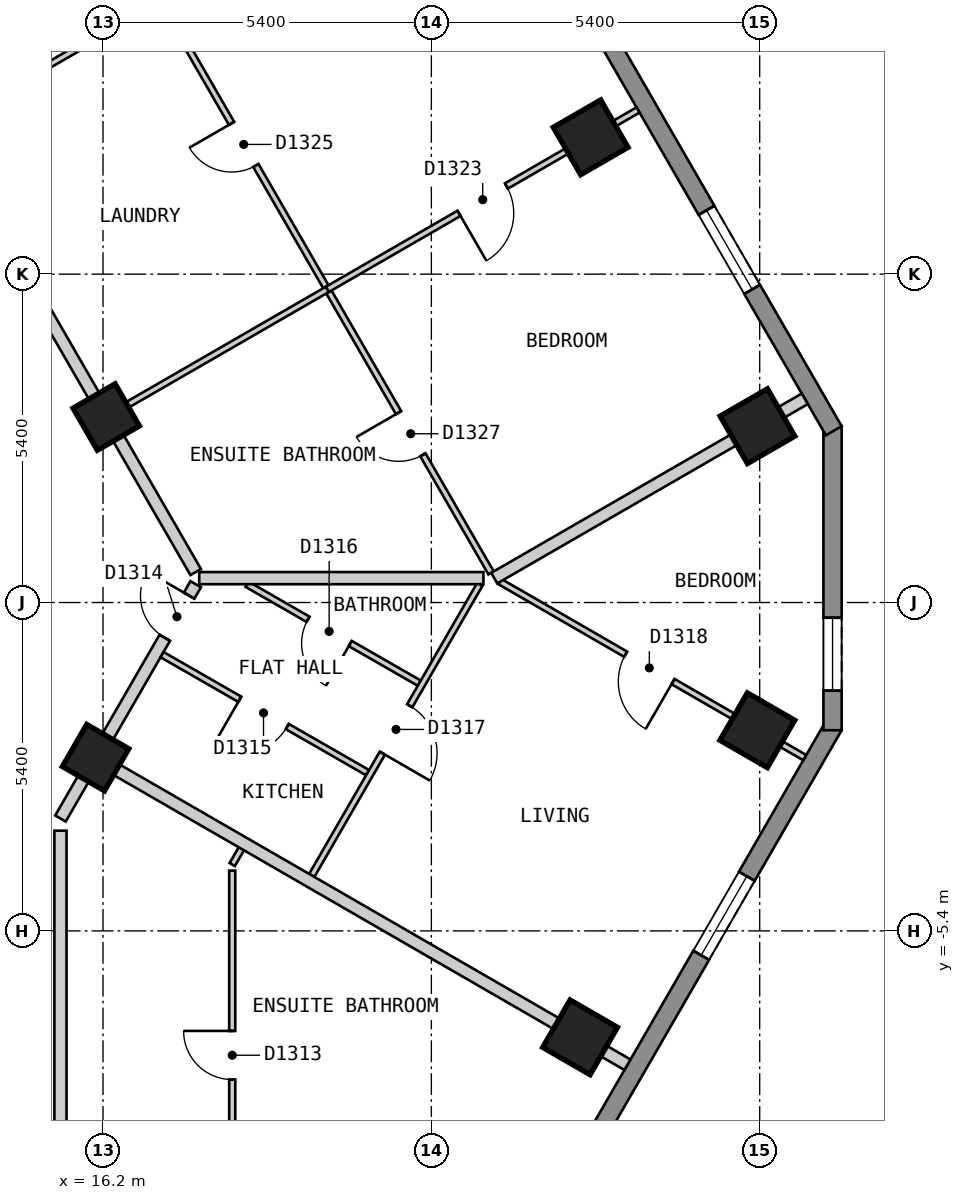
"""IFC4 building model, lengths in metres.
Left out: names, types, materials, properties, quantities, classifications, styles, units other than length and angle.
Written with IfcOpenShell. Run it as: python <this file> out.ifc"""

import sys

from ifc_helpers import new_model, si_unit, direction, frame, frame_2d, origin, origin_2d, place, context, subcontext, project, spatial, polyline, rectangle, outline, extrude, element, fill, save


model = new_model("IFC4")
c1 = context("Model", 3, precision=1e-05, world=origin(), true_north=direction((0.0, 1.0)))
c2 = subcontext(c1, "Body", "Model", "MODEL_VIEW")
j1 = project(units=[si_unit("LENGTHUNIT", "METRE"), si_unit("PLANEANGLEUNIT", "RADIAN")], contexts=[c1])
p1 = place(None, origin())
s1 = spatial("IfcSite", under=j1, at=p1, CompositionType="ELEMENT")
p2 = place(p1, origin())
s2 = spatial("IfcBuilding", under=s1, at=p2, CompositionType="ELEMENT")
p3 = place(p2, frame((0.0, 0.0, 147.6)))
s3 = spatial("IfcBuildingStorey", under=s2, at=p3, CompositionType="ELEMENT", Elevation=147.6)
for number, where, z_axis, x_axis in (
    (1, (24.046, -7.151, 0.0), (0.0, 0.0, 1.0), (0.5, 0.866, 0.0)),
    (2, (26.961, -2.101, 0.0), (0.0, 0.0, 1.0), (0.5, 0.866, 0.0)),
    (3, (26.963, 2.9, 0.0), (0.0, 0.0, 1.0), (-0.5, 0.866, 0.0)),
    (4, (24.22, 7.65, 0.0), (0.0, 0.0, 1.0), (-0.5, 0.866, 0.0)),
):
    element("IfcColumn", number, at=place(p3, frame(where, z_axis=z_axis, x_axis=x_axis)), inside=s3, PredefinedType="COLUMN", context=c2, shape_type="SweptSolid", body=[
        extrude(rectangle(XDim=0.9, YDim=0.9, at=origin_2d()), origin(), (0.0, 0.0, 1.0), 3.0),
    ])
for number, where, z_axis, x_axis in (
    (5, (16.078, -2.551, 0.0), (0.0, 0.0, 1.0), (0.5, 0.866, 0.0)),
    (6, (16.253, 3.05, 0.0), (0.0, 0.0, 1.0), (-0.5, 0.866, 0.0)),
):
    element("IfcColumn", number, at=place(p3, frame(where, z_axis=z_axis, x_axis=x_axis)), inside=s3, PredefinedType="COLUMN", context=c2, shape_type="SweptSolid", body=[
        extrude(rectangle(XDim=0.8, YDim=0.8, at=origin_2d()), origin(), (0.0, 0.0, 1.0), 3.0),
    ])
p4 = place(p3, frame((15.862, -23.425, 0.0), z_axis=(0.0, 0.0, 1.0), x_axis=(0.500017503135, 0.866015298109, 0.0)))
e7 = element("IfcWall", 7, at=p4, inside=s3, PredefinedType="SOLIDWALL", context=c2, shape_type="SweptSolid", body=[
    extrude(outline(polyline([(0.0, -0.15), (24.711, -0.15), (24.631, 0.15), (0.08, 0.15), (0.0, -0.15)])), origin(), (0.0, 0.0, 1.0), 2.7),
])
p5 = place(p4, frame((2.857, 0.0, 0.15)))
e8 = element("IfcOpeningElement", 8, at=p5, cuts=e7, PredefinedType="OPENING", context=c2, shape_type="SweptSolid", body=[
    extrude(rectangle(XDim=1.5, YDim=2.1, at=frame_2d((0.75, 1.05))), frame((0.0, 0.16, 0.0), z_axis=(0.0, -1.0, 0.0), x_axis=(1.0, 0.0, 0.0)), (0.0, 0.0, 1.0), 0.32),
])
p6 = place(p4, frame((8.689, 0.0, 0.15)))
e9 = element("IfcOpeningElement", 9, at=p6, cuts=e7, PredefinedType="OPENING", context=c2, shape_type="SweptSolid", body=[
    extrude(rectangle(XDim=1.5, YDim=2.1, at=frame_2d((0.75, 1.05))), frame((0.0, 0.16, 0.0), z_axis=(0.0, -1.0, 0.0), x_axis=(1.0, 0.0, 0.0)), (0.0, 0.0, 1.0), 0.32),
])
p7 = place(p4, frame((14.52, 0.0, 0.15)))
e10 = element("IfcOpeningElement", 10, at=p7, cuts=e7, PredefinedType="OPENING", context=c2, shape_type="SweptSolid", body=[
    extrude(rectangle(XDim=1.5, YDim=2.1, at=frame_2d((0.75, 1.05))), frame((0.0, 0.16, 0.0), z_axis=(0.0, -1.0, 0.0), x_axis=(1.0, 0.0, 0.0)), (0.0, 0.0, 1.0), 0.32),
])
p8 = place(p4, frame((20.351, 0.0, 0.15)))
e11 = element("IfcOpeningElement", 11, at=p8, cuts=e7, PredefinedType="OPENING", context=c2, shape_type="SweptSolid", body=[
    extrude(rectangle(XDim=1.5, YDim=2.1, at=frame_2d((0.75, 1.05))), frame((0.0, 0.16, 0.0), z_axis=(0.0, -1.0, 0.0), x_axis=(1.0, 0.0, 0.0)), (0.0, 0.0, 1.0), 0.32),
])
p9 = place(p3, frame((28.198, -2.1, 0.0), z_axis=(0.0, 0.0, 1.0), x_axis=(0.0, 1.0, 0.0)))
e12 = element("IfcWall", 12, at=p9, inside=s3, PredefinedType="SOLIDWALL", context=c2, shape_type="SweptSolid", body=[
    extrude(outline(polyline([(0.0, -0.15), (5.0, -0.15), (4.92, 0.15), (0.08, 0.15), (0.0, -0.15)])), origin(), (0.0, 0.0, 1.0), 2.7),
])
p10 = place(p9, frame((0.65, 0.0, 0.15)))
e13 = element("IfcOpeningElement", 13, at=p10, cuts=e12, PredefinedType="OPENING", context=c2, shape_type="SweptSolid", body=[
    extrude(rectangle(XDim=1.2, YDim=2.1, at=frame_2d((0.6, 1.05))), frame((0.0, 0.16, 0.0), z_axis=(0.0, -1.0, 0.0), x_axis=(1.0, 0.0, 0.0)), (0.0, 0.0, 1.0), 0.32),
])
p11 = place(p3, frame((28.218, 2.825, 0.0), z_axis=(0.0, 0.0, 1.0), x_axis=(-0.500020536353, 0.866013546791, 0.0)))
e14 = element("IfcWall", 14, at=p11, inside=s3, PredefinedType="SOLIDWALL", context=c2, shape_type="SweptSolid", body=[
    extrude(outline(polyline([(0.0, -0.15), (23.325, -0.15), (23.245, 0.15), (0.08, 0.15), (0.0, -0.15)])), origin(), (0.0, 0.0, 1.0), 2.7),
])
p12 = place(p11, frame((2.685, 0.0, 0.15)))
e15 = element("IfcOpeningElement", 15, at=p12, cuts=e14, PredefinedType="OPENING", context=c2, shape_type="SweptSolid", body=[
    extrude(rectangle(XDim=1.5, YDim=2.1, at=frame_2d((0.75, 1.05))), frame((0.0, 0.16, 0.0), z_axis=(0.0, -1.0, 0.0), x_axis=(1.0, 0.0, 0.0)), (0.0, 0.0, 1.0), 0.32),
])
p13 = place(p11, frame((8.17, 0.0, 0.15)))
e16 = element("IfcOpeningElement", 16, at=p13, cuts=e14, PredefinedType="OPENING", context=c2, shape_type="SweptSolid", body=[
    extrude(rectangle(XDim=1.5, YDim=2.1, at=frame_2d((0.75, 1.05))), frame((0.0, 0.16, 0.0), z_axis=(0.0, -1.0, 0.0), x_axis=(1.0, 0.0, 0.0)), (0.0, 0.0, 1.0), 0.32),
])
p14 = place(p11, frame((13.655, 0.0, 0.15)))
e17 = element("IfcOpeningElement", 17, at=p14, cuts=e14, PredefinedType="OPENING", context=c2, shape_type="SweptSolid", body=[
    extrude(rectangle(XDim=1.5, YDim=2.1, at=frame_2d((0.75, 1.05))), frame((0.0, 0.16, 0.0), z_axis=(0.0, -1.0, 0.0), x_axis=(1.0, 0.0, 0.0)), (0.0, 0.0, 1.0), 0.32),
])
p15 = place(p11, frame((19.14, 0.0, 0.15)))
e18 = element("IfcOpeningElement", 18, at=p15, cuts=e14, PredefinedType="OPENING", context=c2, shape_type="SweptSolid", body=[
    extrude(rectangle(XDim=1.5, YDim=2.1, at=frame_2d((0.75, 1.05))), frame((0.0, 0.16, 0.0), z_axis=(0.0, -1.0, 0.0), x_axis=(1.0, 0.0, 0.0)), (0.0, 0.0, 1.0), 0.32),
])
p16 = place(p3, frame((9.296, 15.1, 0.0), z_axis=(0.0, 0.0, 1.0), x_axis=(0.499974024244, -0.866040400375, 0.0)))
e19 = element("IfcWall", 19, at=p16, inside=s3, PredefinedType="PARTITIONING", context=c2, shape_type="SweptSolid", body=[
    extrude(rectangle(XDim=16.857, YDim=0.2, at=frame_2d((8.429, 0.0))), origin(), (0.0, 0.0, 1.0), 2.7),
])
p17 = place(p16, frame((5.209, 0.0, 0.0)))
e20 = element("IfcOpeningElement", 20, at=p17, cuts=e19, PredefinedType="OPENING", context=c2, shape_type="SweptSolid", body=[
    extrude(rectangle(XDim=1.0, YDim=2.1, at=frame_2d((0.5, 1.05))), frame((0.0, 0.11, 0.0), z_axis=(0.0, -1.0, 0.0), x_axis=(1.0, 0.0, 0.0)), (0.0, 0.0, 1.0), 0.22),
])
p18 = place(p3, frame((15.5, -3.752, 0.0), z_axis=(0.0, 0.0, 1.0), x_axis=(0.0, -1.0, 0.0)))
e21 = element("IfcWall", 21, at=p18, inside=s3, PredefinedType="PARTITIONING", context=c2, shape_type="SweptSolid", body=[
    extrude(rectangle(XDim=5.198, YDim=0.2, at=frame_2d((2.599, 0.0))), origin(), (0.0, 0.0, 1.0), 2.7),
])
p19 = place(p3, frame((15.5, -3.552, 0.0), z_axis=(0.0, 0.0, 1.0), x_axis=(0.499928303779, 0.86606679366, 0.0)))
e22 = element("IfcWall", 22, at=p19, inside=s3, PredefinedType="PARTITIONING", context=c2, shape_type="SweptSolid", body=[
    extrude(rectangle(XDim=4.449, YDim=0.2, at=frame_2d((2.225, 0.0))), origin(), (0.0, 0.0, 1.0), 2.7),
])
p20 = place(p19, frame((3.432, 0.0, 0.0)))
e23 = element("IfcOpeningElement", 23, at=p20, cuts=e22, PredefinedType="OPENING", context=c2, shape_type="SweptSolid", body=[
    extrude(rectangle(XDim=0.8, YDim=2.1, at=frame_2d((0.4, 1.05))), frame((0.0, 0.11, 0.0), z_axis=(0.0, -1.0, 0.0), x_axis=(1.0, 0.0, 0.0)), (0.0, 0.0, 1.0), 0.22),
])
p21 = place(p3, frame((11.713, 19.313, 0.0), z_axis=(0.0, 0.0, 1.0), x_axis=(0.499999523185, -0.866025679073, 0.0)))
e24 = element("IfcWall", 24, at=p21, inside=s3, PredefinedType="PARTITIONING", context=c2, shape_type="SweptSolid", body=[
    extrude(rectangle(XDim=21.738, YDim=0.1, at=frame_2d((10.869, 0.0))), origin(), (0.0, 0.0, 1.0), 2.7),
])
p22 = place(p21, frame((7.654, 0.0, 0.0)))
e25 = element("IfcOpeningElement", 25, at=p22, cuts=e24, PredefinedType="OPENING", context=c2, shape_type="SweptSolid", body=[
    extrude(rectangle(XDim=0.9, YDim=2.1, at=frame_2d((0.45, 1.05))), frame((0.0, 0.06, 0.0), z_axis=(0.0, -1.0, 0.0), x_axis=(1.0, 0.0, 0.0)), (0.0, 0.0, 1.0), 0.12),
])
p23 = place(p21, frame((13.202, 0.0, 0.0)))
e26 = element("IfcOpeningElement", 26, at=p23, cuts=e24, PredefinedType="OPENING", context=c2, shape_type="SweptSolid", body=[
    extrude(rectangle(XDim=0.8, YDim=2.1, at=frame_2d((0.4, 1.05))), frame((0.0, 0.06, 0.0), z_axis=(0.0, -1.0, 0.0), x_axis=(1.0, 0.0, 0.0)), (0.0, 0.0, 1.0), 0.12),
])
p24 = place(p21, frame((2.242, 0.0, 0.0)))
e27 = element("IfcOpeningElement", 27, at=p24, cuts=e24, PredefinedType="OPENING", context=c2, shape_type="SweptSolid", body=[
    extrude(rectangle(XDim=0.8, YDim=2.1, at=frame_2d((0.4, 1.05))), frame((0.0, 0.06, 0.0), z_axis=(0.0, -1.0, 0.0), x_axis=(1.0, 0.0, 0.0)), (0.0, 0.0, 1.0), 0.12),
])
p25 = place(p21, frame((18.696, 0.0, 0.0)))
e28 = element("IfcOpeningElement", 28, at=p25, cuts=e24, PredefinedType="OPENING", context=c2, shape_type="SweptSolid", body=[
    extrude(rectangle(XDim=0.8, YDim=2.1, at=frame_2d((0.4, 1.05))), frame((0.0, 0.06, 0.0), z_axis=(0.0, -1.0, 0.0), x_axis=(1.0, 0.0, 0.0)), (0.0, 0.0, 1.0), 0.12),
])
p26 = place(p3, frame((18.325, -4.409, 0.0), z_axis=(0.0, 0.0, 1.0), x_axis=(0.0, -1.0, 0.0)))
e29 = element("IfcWall", 29, at=p26, inside=s3, PredefinedType="PARTITIONING", context=c2, shape_type="SweptSolid", body=[
    extrude(rectangle(XDim=6.115, YDim=0.1, at=frame_2d((3.058, 0.0))), origin(), (0.0, 0.0, 1.0), 2.7),
])
p27 = place(p26, frame((2.636, 0.0, 0.0)))
e30 = element("IfcOpeningElement", 30, at=p27, cuts=e29, PredefinedType="OPENING", context=c2, shape_type="SweptSolid", body=[
    extrude(rectangle(XDim=0.8, YDim=2.1, at=frame_2d((0.4, 1.05))), frame((0.0, 0.06, 0.0), z_axis=(0.0, -1.0, 0.0), x_axis=(1.0, 0.0, 0.0)), (0.0, 0.0, 1.0), 0.12),
])
p28 = place(p3, frame((17.171, -0.857, 0.0), z_axis=(0.0, 0.0, 1.0), x_axis=(0.867173455867, -0.49800622229, 0.0)))
e31 = element("IfcWall", 31, at=p28, inside=s3, PredefinedType="PARTITIONING", context=c2, shape_type="SweptSolid", body=[
    extrude(rectangle(XDim=3.898, YDim=0.1, at=frame_2d((1.949, 0.0))), origin(), (0.0, 0.0, 1.0), 2.7),
])
p29 = place(p28, frame((1.474, 0.0, 0.0)))
e32 = element("IfcOpeningElement", 32, at=p29, cuts=e31, PredefinedType="OPENING", context=c2, shape_type="SweptSolid", body=[
    extrude(rectangle(XDim=0.9, YDim=2.1, at=frame_2d((0.45, 1.05))), frame((0.0, 0.06, 0.0), z_axis=(0.0, -1.0, 0.0), x_axis=(1.0, 0.0, 0.0)), (0.0, 0.0, 1.0), 0.12),
])
p30 = place(p3, frame((18.568, 0.301, 0.0), z_axis=(0.0, 0.0, 1.0), x_axis=(0.867155675456, -0.49803718187, 0.0)))
e33 = element("IfcWall", 33, at=p30, inside=s3, PredefinedType="PARTITIONING", context=c2, shape_type="SweptSolid", body=[
    extrude(rectangle(XDim=3.267, YDim=0.1, at=frame_2d((1.633, 0.0))), origin(), (0.0, 0.0, 1.0), 2.7),
])
p31 = place(p30, frame((1.158, 0.0, 0.0)))
e34 = element("IfcOpeningElement", 34, at=p31, cuts=e33, PredefinedType="OPENING", context=c2, shape_type="SweptSolid", body=[
    extrude(rectangle(XDim=0.8, YDim=2.1, at=frame_2d((0.4, 1.05))), frame((0.0, 0.06, 0.0), z_axis=(0.0, -1.0, 0.0), x_axis=(1.0, 0.0, 0.0)), (0.0, 0.0, 1.0), 0.12),
])
p32 = place(p3, frame((22.729, 0.343, 0.0), z_axis=(0.0, 0.0, 1.0), x_axis=(0.865996608848, -0.500049870977, 0.0)))
e35 = element("IfcWall", 35, at=p32, inside=s3, PredefinedType="PARTITIONING", context=c2, shape_type="SweptSolid", body=[
    extrude(rectangle(XDim=5.788, YDim=0.1, at=frame_2d((2.894, 0.0))), origin(), (0.0, 0.0, 1.0), 2.7),
])
p33 = place(p32, frame((2.386, 0.0, 0.0)))
e36 = element("IfcOpeningElement", 36, at=p33, cuts=e35, PredefinedType="OPENING", context=c2, shape_type="SweptSolid", body=[
    extrude(rectangle(XDim=0.9, YDim=2.1, at=frame_2d((0.45, 1.05))), frame((0.0, 0.06, 0.0), z_axis=(0.0, -1.0, 0.0), x_axis=(1.0, 0.0, 0.0)), (0.0, 0.0, 1.0), 0.12),
])
p34 = place(p3, frame((18.325, -4.309, 0.0), z_axis=(0.0, 0.0, 1.0), x_axis=(0.5014706583, 0.865174652232, 0.0)))
e37 = element("IfcWall", 37, at=p34, inside=s3, PredefinedType="PARTITIONING", context=c2, shape_type="SweptSolid", body=[
    extrude(rectangle(XDim=0.399, YDim=0.1, at=frame_2d((0.199, 0.0))), origin(), (0.0, 0.0, 1.0), 2.7),
])
p35 = place(p3, frame((19.633, -4.488, 0.0), z_axis=(0.0, 0.0, 1.0), x_axis=(0.499989971015, 0.866031193944, 0.0)))
e38 = element("IfcWall", 38, at=p35, inside=s3, PredefinedType="PARTITIONING", context=c2, shape_type="SweptSolid", body=[
    extrude(rectangle(XDim=5.53, YDim=0.1, at=frame_2d((2.765, 0.0))), origin(), (0.0, 0.0, 1.0), 2.7),
])
p36 = place(p35, frame((2.322, 0.0, 0.0)))
e39 = element("IfcOpeningElement", 39, at=p36, cuts=e38, PredefinedType="OPENING", context=c2, shape_type="SweptSolid", body=[
    extrude(rectangle(XDim=0.9, YDim=2.1, at=frame_2d((0.45, 1.05))), frame((0.0, 0.06, 0.0), z_axis=(0.0, -1.0, 0.0), x_axis=(1.0, 0.0, 0.0)), (0.0, 0.0, 1.0), 0.12),
])
p37 = place(p3, frame((16.339, 3.1, 0.0), z_axis=(0.0, 0.0, 1.0), x_axis=(0.866050731258, 0.499956128963, 0.0)))
e40 = element("IfcWall", 40, at=p37, inside=s3, PredefinedType="PARTITIONING", context=c2, shape_type="SweptSolid", body=[
    extrude(rectangle(XDim=4.1, YDim=0.1, at=frame_2d((2.05, 0.0))), origin(), (0.0, 0.0, 1.0), 2.7),
])
p38 = place(p3, frame((13.597, 7.85, 0.0), z_axis=(0.0, 0.0, 1.0), x_axis=(0.866015917575, 0.500016430238, 0.0)))
e41 = element("IfcWall", 41, at=p38, inside=s3, PredefinedType="PARTITIONING", context=c2, shape_type="SweptSolid", body=[
    extrude(rectangle(XDim=4.05, YDim=0.1, at=frame_2d((2.025, 0.0))), origin(), (0.0, 0.0, 1.0), 2.7),
])
p39 = place(p3, frame((16.165, -2.601, 0.0), z_axis=(0.0, 0.0, 1.0), x_axis=(0.866016855193, -0.500014806302, 0.0)))
e42 = element("IfcWall", 42, at=p39, inside=s3, PredefinedType="PARTITIONING", context=c2, shape_type="SweptSolid", body=[
    extrude(rectangle(XDim=10.0, YDim=0.2, at=frame_2d((5.0, 0.0))), origin(), (0.0, 0.0, 1.0), 2.7),
])
p40 = place(p3, frame((17.782, 0.401, 0.0), z_axis=(0.0, 0.0, 1.0), x_axis=(1.0, 0.0, 0.0)))
e43 = element("IfcWall", 43, at=p40, inside=s3, PredefinedType="PARTITIONING", context=c2, shape_type="SweptSolid", body=[
    extrude(rectangle(XDim=4.674, YDim=0.2, at=frame_2d((2.337, 0.0))), origin(), (0.0, 0.0, 1.0), 2.7),
])
p41 = place(p3, frame((22.634, 0.401, 0.0), z_axis=(0.0, 0.0, 1.0), x_axis=(0.86601325737, 0.500021037617, 0.0)))
e44 = element("IfcWall", 44, at=p41, inside=s3, PredefinedType="PARTITIONING", context=c2, shape_type="SweptSolid", body=[
    extrude(rectangle(XDim=5.898, YDim=0.2, at=frame_2d((2.949, 0.0))), origin(), (0.0, 0.0, 1.0), 2.7),
])
p42 = place(p3, frame((19.89, 5.15, 0.0), z_axis=(0.0, 0.0, 1.0), x_axis=(0.865993310977, 0.500055582255, 0.0)))
e45 = element("IfcWall", 45, at=p42, inside=s3, PredefinedType="PARTITIONING", context=c2, shape_type="SweptSolid", body=[
    extrude(rectangle(XDim=5.9, YDim=0.1, at=frame_2d((2.95, 0.0))), origin(), (0.0, 0.0, 1.0), 2.7),
])
p43 = place(p42, frame((2.5, 0.0, 0.0)))
e46 = element("IfcOpeningElement", 46, at=p43, cuts=e45, PredefinedType="OPENING", context=c2, shape_type="SweptSolid", body=[
    extrude(rectangle(XDim=0.9, YDim=2.1, at=frame_2d((0.45, 1.05))), frame((0.0, 0.06, 0.0), z_axis=(0.0, -1.0, 0.0), x_axis=(1.0, 0.0, 0.0)), (0.0, 0.0, 1.0), 0.12),
])
p44 = place(p8, origin())
e47 = element("IfcWindow", 47, at=p44, inside=s3, PartitioningType="SINGLE_PANEL", PredefinedType="WINDOW", context=c2, shape_type="SweptSolid", body=[
    extrude(rectangle(XDim=1.5, YDim=2.1, at=frame_2d((0.75, 1.05))), frame((0.0, 0.03, 0.0), z_axis=(0.0, -1.0, 0.0), x_axis=(1.0, 0.0, 0.0)), (0.0, 0.0, 1.0), 0.06),
])
fill(e11, e47)
p45 = place(p10, origin())
e48 = element("IfcWindow", 48, at=p45, inside=s3, PartitioningType="SINGLE_PANEL", PredefinedType="WINDOW", context=c2, shape_type="SweptSolid", body=[
    extrude(rectangle(XDim=1.2, YDim=2.1, at=frame_2d((0.6, 1.05))), frame((0.0, 0.03, 0.0), z_axis=(0.0, -1.0, 0.0), x_axis=(1.0, 0.0, 0.0)), (0.0, 0.0, 1.0), 0.06),
])
fill(e13, e48)
p46 = place(p12, origin())
e49 = element("IfcWindow", 49, at=p46, inside=s3, PartitioningType="SINGLE_PANEL", PredefinedType="WINDOW", context=c2, shape_type="SweptSolid", body=[
    extrude(rectangle(XDim=1.5, YDim=2.1, at=frame_2d((0.75, 1.05))), frame((0.0, 0.03, 0.0), z_axis=(0.0, -1.0, 0.0), x_axis=(1.0, 0.0, 0.0)), (0.0, 0.0, 1.0), 0.06),
])
fill(e15, e49)
p47 = place(p27, origin())
e50 = element("IfcDoor", 50, at=p47, inside=s3, OperationType="SINGLE_SWING_LEFT", PredefinedType="DOOR", context=c2, shape_type="SweptSolid", body=[
    extrude(rectangle(XDim=0.8, YDim=2.1, at=frame_2d((0.4, 1.05))), frame((0.0, 0.025, 0.0), z_axis=(0.0, -1.0, 0.0), x_axis=(1.0, 0.0, 0.0)), (0.0, 0.0, 1.0), 0.05),
])
fill(e30, e50)
p48 = place(p20, origin())
e51 = element("IfcDoor", 51, at=p48, inside=s3, OperationType="SINGLE_SWING_RIGHT", PredefinedType="DOOR", context=c2, shape_type="SweptSolid", body=[
    extrude(rectangle(XDim=0.8, YDim=2.1, at=frame_2d((0.4, 1.05))), frame((0.0, 0.025, 0.0), z_axis=(0.0, -1.0, 0.0), x_axis=(1.0, 0.0, 0.0)), (0.0, 0.0, 1.0), 0.05),
])
fill(e23, e51)
p49 = place(p29, origin())
e52 = element("IfcDoor", 52, at=p49, inside=s3, OperationType="SINGLE_SWING_LEFT", PredefinedType="DOOR", context=c2, shape_type="SweptSolid", body=[
    extrude(rectangle(XDim=0.9, YDim=2.1, at=frame_2d((0.45, 1.05))), frame((0.0, 0.025, 0.0), z_axis=(0.0, -1.0, 0.0), x_axis=(1.0, 0.0, 0.0)), (0.0, 0.0, 1.0), 0.05),
])
fill(e32, e52)
p50 = place(p31, origin())
e53 = element("IfcDoor", 53, at=p50, inside=s3, OperationType="SINGLE_SWING_RIGHT", PredefinedType="DOOR", context=c2, shape_type="SweptSolid", body=[
    extrude(rectangle(XDim=0.8, YDim=2.1, at=frame_2d((0.4, 1.05))), frame((0.0, 0.025, 0.0), z_axis=(0.0, -1.0, 0.0), x_axis=(1.0, 0.0, 0.0)), (0.0, 0.0, 1.0), 0.05),
])
fill(e34, e53)
p51 = place(p36, origin())
e54 = element("IfcDoor", 54, at=p51, inside=s3, OperationType="SINGLE_SWING_LEFT", PredefinedType="DOOR", context=c2, shape_type="SweptSolid", body=[
    extrude(rectangle(XDim=0.9, YDim=2.1, at=frame_2d((0.45, 1.05))), frame((0.0, 0.025, 0.0), z_axis=(0.0, -1.0, 0.0), x_axis=(1.0, 0.0, 0.0)), (0.0, 0.0, 1.0), 0.05),
])
fill(e39, e54)
p52 = place(p33, origin())
e55 = element("IfcDoor", 55, at=p52, inside=s3, OperationType="SINGLE_SWING_RIGHT", PredefinedType="DOOR", context=c2, shape_type="SweptSolid", body=[
    extrude(rectangle(XDim=0.9, YDim=2.1, at=frame_2d((0.45, 1.05))), frame((0.0, 0.025, 0.0), z_axis=(0.0, -1.0, 0.0), x_axis=(1.0, 0.0, 0.0)), (0.0, 0.0, 1.0), 0.05),
])
fill(e36, e55)
p53 = place(p43, origin())
e56 = element("IfcDoor", 56, at=p53, inside=s3, OperationType="SINGLE_SWING_LEFT", PredefinedType="DOOR", context=c2, shape_type="SweptSolid", body=[
    extrude(rectangle(XDim=0.9, YDim=2.1, at=frame_2d((0.45, 1.05))), frame((0.0, 0.025, 0.0), z_axis=(0.0, -1.0, 0.0), x_axis=(1.0, 0.0, 0.0)), (0.0, 0.0, 1.0), 0.05),
])
fill(e46, e56)
p54 = place(p23, origin())
e57 = element("IfcDoor", 57, at=p54, inside=s3, OperationType="SINGLE_SWING_LEFT", PredefinedType="DOOR", context=c2, shape_type="SweptSolid", body=[
    extrude(rectangle(XDim=0.8, YDim=2.1, at=frame_2d((0.4, 1.05))), frame((0.0, 0.025, 0.0), z_axis=(0.0, -1.0, 0.0), x_axis=(1.0, 0.0, 0.0)), (0.0, 0.0, 1.0), 0.05),
])
fill(e26, e57)
p55 = place(p25, origin())
e58 = element("IfcDoor", 58, at=p55, inside=s3, OperationType="SINGLE_SWING_LEFT", PredefinedType="DOOR", context=c2, shape_type="SweptSolid", body=[
    extrude(rectangle(XDim=0.8, YDim=2.1, at=frame_2d((0.4, 1.05))), frame((0.0, 0.025, 0.0), z_axis=(0.0, -1.0, 0.0), x_axis=(1.0, 0.0, 0.0)), (0.0, 0.0, 1.0), 0.05),
])
fill(e28, e58)
save(model, sys.argv[1])
